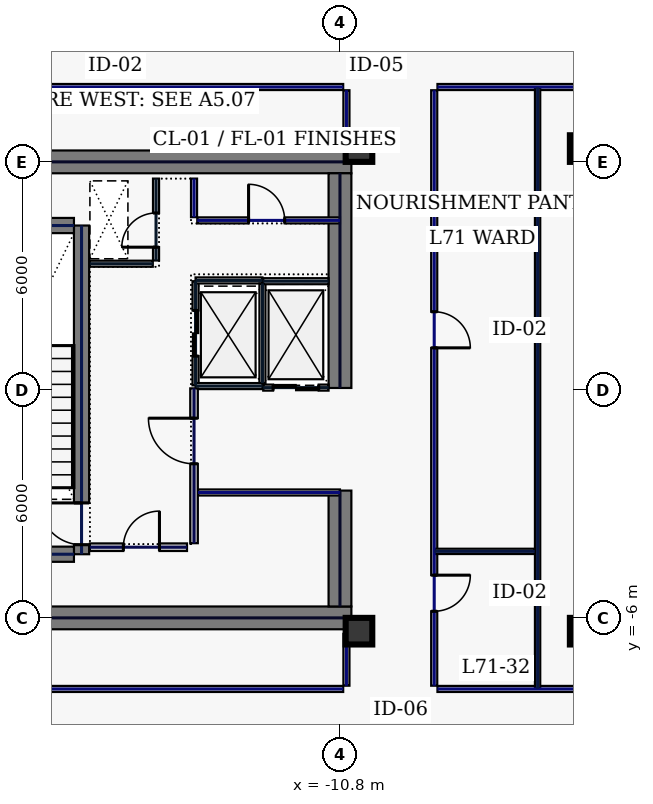
"""IFC4 building model, lengths in metres.
Left out: names, types, materials, properties, quantities, classifications, styles, units other than length and angle.
Written with IfcOpenShell. Run it as: python <this file> out.ifc"""

import sys

from ifc_helpers import new_model, si_unit, direction, frame, frame_2d, origin, origin_2d, place, context, subcontext, project, spatial, rectangle, hollow_rectangle, extrude, element, fill, save


model = new_model("IFC4")
c1 = context("Model", 3, precision=1e-05, world=origin(), true_north=direction((0.0, 1.0)))
c2 = subcontext(c1, "Body", "Model", "MODEL_VIEW")
j1 = project(units=[si_unit("LENGTHUNIT", "METRE"), si_unit("PLANEANGLEUNIT", "RADIAN")], contexts=[c1])
p1 = place(None, origin())
s1 = spatial("IfcSite", under=j1, at=p1, CompositionType="ELEMENT")
p2 = place(p1, origin())
s2 = spatial("IfcBuilding", under=s1, at=p2, CompositionType="ELEMENT")
p3 = place(p2, frame((0.0, 0.0, 305.0)))
s3 = spatial("IfcBuildingStorey", under=s2, at=p3, CompositionType="ELEMENT", Elevation=305.0)
for number, where, z_axis, x_axis in (
    (1, (-22.0, 6.0, 0.0), (0.0, 0.0, 1.0), (1.0, 0.0, 0.0)),
    (2, (-22.0, -6.0, 0.0), (0.0, 0.0, 1.0), (1.0, 0.0, 0.0)),
):
    element("IfcWall", number, at=place(p3, frame(where, z_axis=z_axis, x_axis=x_axis)), inside=s3, PredefinedType="SHEAR", context=c2, shape_type="SweptSolid", body=[
        extrude(rectangle(XDim=11.5, YDim=0.6, at=frame_2d((5.75, 0.0))), origin(), (0.0, 0.0, 1.0), 3.74),
    ])
p4 = place(p3, frame((-10.8, -5.7, 0.0), z_axis=(0.0, 0.0, 1.0), x_axis=(0.0, 1.0, 0.0)))
e3 = element("IfcWall", 3, at=p4, inside=s3, PredefinedType="SHEAR", context=c2, shape_type="SweptSolid", body=[
    extrude(rectangle(XDim=3.05, YDim=0.6, at=frame_2d((1.525, 0.0))), origin(), (0.0, 0.0, 1.0), 3.74),
])
p5 = place(p3, frame((-10.8, 0.05, 0.0), z_axis=(0.0, 0.0, 1.0), x_axis=(0.0, 1.0, 0.0)))
e4 = element("IfcWall", 4, at=p5, inside=s3, PredefinedType="SHEAR", context=c2, shape_type="SweptSolid", body=[
    extrude(rectangle(XDim=5.65, YDim=0.6, at=frame_2d((2.825, 0.0))), origin(), (0.0, 0.0, 1.0), 3.74),
])
p6 = place(p3, frame((-17.6, -4.325, 0.0), z_axis=(0.0, 0.0, 1.0), x_axis=(0.0, 1.0, 0.0)))
e5 = element("IfcWall", 5, at=p6, inside=s3, PredefinedType="SHEAR", context=c2, shape_type="SweptSolid", body=[
    extrude(rectangle(XDim=8.65, YDim=0.4, at=frame_2d((4.325, 0.0))), origin(), (0.0, 0.0, 1.0), 3.74),
])
p7 = place(p6, frame((0.25, 0.0, 0.0)))
e6 = element("IfcOpeningElement", 6, at=p7, cuts=e5, PredefinedType="OPENING", context=c2, shape_type="SweptSolid", body=[
    extrude(rectangle(XDim=1.1, YDim=2.2, at=frame_2d((0.55, 1.1))), frame((0.0, 0.21, 0.0), z_axis=(0.0, -1.0, 0.0), x_axis=(1.0, 0.0, 0.0)), (0.0, 0.0, 1.0), 0.42),
])
for number, where, z_axis, x_axis in (
    (7, (-21.2, -4.325, 0.0), (0.0, 0.0, 1.0), (1.0, 0.0, 0.0)),
    (8, (-21.2, 4.325, 0.0), (0.0, 0.0, 1.0), (1.0, 0.0, 0.0)),
):
    element("IfcWall", number, at=place(p3, frame(where, z_axis=z_axis, x_axis=x_axis)), inside=s3, PredefinedType="SHEAR", context=c2, shape_type="SweptSolid", body=[
        extrude(rectangle(XDim=3.4, YDim=0.4, at=frame_2d((1.7, 0.0))), origin(), (0.0, 0.0, 1.0), 3.74),
    ])
for number, where, z_axis, x_axis in (
    (9, (-10.3, -6.35, 0.0), (0.0, 0.0, 1.0), (1.0, 0.0, 0.0)),
    (10, (-10.3, 6.35, 0.0), (0.0, 0.0, 1.0), (1.0, 0.0, 0.0)),
    (11, (-4.4, -6.35, 0.0), (0.0, 0.0, 1.0), (1.0, 0.0, 0.0)),
    (12, (-4.4, 6.35, 0.0), (0.0, 0.0, 1.0), (1.0, 0.0, 0.0)),
):
    element("IfcColumn", number, at=place(p3, frame(where, z_axis=z_axis, x_axis=x_axis)), inside=s3, PredefinedType="COLUMN", context=c2, shape_type="SweptSolid", body=[
        extrude(hollow_rectangle(XDim=0.7, YDim=0.7, WallThickness=0.032, at=origin_2d()), origin(), (0.0, 0.0, 1.0), 3.74),
    ])
p8 = place(p3, frame((-14.6, 0.12, 0.0), z_axis=(0.0, 0.0, 1.0), x_axis=(0.0, 1.0, 0.0)))
e13 = element("IfcWall", 13, at=p8, inside=s3, PredefinedType="PARTITIONING", context=c2, shape_type="SweptSolid", body=[
    extrude(rectangle(XDim=2.74, YDim=0.16, at=frame_2d((1.37, 0.0))), origin(), (0.0, 0.0, 1.0), 3.74),
])
p9 = place(p8, frame((0.77, 0.0, 0.0)))
e14 = element("IfcOpeningElement", 14, at=p9, cuts=e13, PredefinedType="OPENING", context=c2, shape_type="SweptSolid", body=[
    extrude(rectangle(XDim=1.2, YDim=2.2, at=frame_2d((0.6, 1.1))), frame((0.0, 0.09, 0.0), z_axis=(0.0, -1.0, 0.0), x_axis=(1.0, 0.0, 0.0)), (0.0, 0.0, 1.0), 0.18),
])
for number, where, z_axis, x_axis in (
    (15, (-14.6, 0.1, 0.0), (0.0, 0.0, 1.0), (1.0, 0.0, 0.0)),
    (16, (-14.6, 2.88, 0.0), (0.0, 0.0, 1.0), (1.0, 0.0, 0.0)),
):
    element("IfcWall", number, at=place(p3, frame(where, z_axis=z_axis, x_axis=x_axis)), inside=s3, PredefinedType="PARTITIONING", context=c2, shape_type="SweptSolid", body=[
        extrude(rectangle(XDim=1.76, YDim=0.16, at=frame_2d((0.88, 0.0))), origin(), (0.0, 0.0, 1.0), 3.74),
    ])
p10 = place(p3, frame((-12.84, 0.18, 0.0), z_axis=(0.0, 0.0, 1.0), x_axis=(0.0, 1.0, 0.0)))
e17 = element("IfcWall", 17, at=p10, inside=s3, PredefinedType="PARTITIONING", context=c2, shape_type="SweptSolid", body=[
    extrude(rectangle(XDim=2.62, YDim=0.16, at=frame_2d((1.31, 0.0))), origin(), (0.0, 0.0, 1.0), 3.74),
])
p11 = place(p3, frame((-12.82, 0.06, 0.0), z_axis=(0.0, 0.0, 1.0), x_axis=(1.0, 0.0, 0.0)))
e18 = element("IfcWall", 18, at=p11, inside=s3, PredefinedType="PARTITIONING", context=c2, shape_type="SweptSolid", body=[
    extrude(rectangle(XDim=1.72, YDim=0.16, at=frame_2d((0.86, 0.0))), origin(), (0.0, 0.0, 1.0), 3.74),
])
p12 = place(p11, frame((0.26, 0.0, 0.0)))
e19 = element("IfcOpeningElement", 19, at=p12, cuts=e18, PredefinedType="OPENING", context=c2, shape_type="SweptSolid", body=[
    extrude(rectangle(XDim=1.2, YDim=2.2, at=frame_2d((0.6, 1.1))), frame((0.0, 0.09, 0.0), z_axis=(0.0, -1.0, 0.0), x_axis=(1.0, 0.0, 0.0)), (0.0, 0.0, 1.0), 0.18),
])
p13 = place(p3, frame((-12.82, 2.86, 0.0), z_axis=(0.0, 0.0, 1.0), x_axis=(1.0, 0.0, 0.0)))
e20 = element("IfcWall", 20, at=p13, inside=s3, PredefinedType="PARTITIONING", context=c2, shape_type="SweptSolid", body=[
    extrude(rectangle(XDim=1.72, YDim=0.16, at=frame_2d((0.86, 0.0))), origin(), (0.0, 0.0, 1.0), 3.74),
])
p14 = place(p3, frame((-15.64, 3.405, 0.0), z_axis=(0.0, 0.0, 1.0), x_axis=(0.0, 1.0, 0.0)))
e21 = element("IfcWall", 21, at=p14, inside=s3, PredefinedType="PARTITIONING", context=c2, shape_type="SweptSolid", body=[
    extrude(rectangle(XDim=2.155, YDim=0.16, at=frame_2d((1.078, 0.0))), origin(), (0.0, 0.0, 1.0), 3.74),
])
p15 = place(p14, frame((0.35, 0.0, 0.0)))
e22 = element("IfcOpeningElement", 22, at=p15, cuts=e21, PredefinedType="OPENING", context=c2, shape_type="SweptSolid", body=[
    extrude(rectangle(XDim=0.9, YDim=2.2, at=frame_2d((0.45, 1.1))), frame((0.0, 0.09, 0.0), z_axis=(0.0, -1.0, 0.0), x_axis=(1.0, 0.0, 0.0)), (0.0, 0.0, 1.0), 0.18),
])
p16 = place(p3, frame((-17.38, 3.32, 0.0), z_axis=(0.0, 0.0, 1.0), x_axis=(1.0, 0.0, 0.0)))
e23 = element("IfcWall", 23, at=p16, inside=s3, PredefinedType="PARTITIONING", context=c2, shape_type="SweptSolid", body=[
    extrude(rectangle(XDim=1.655, YDim=0.16, at=frame_2d((0.827, 0.0))), origin(), (0.0, 0.0, 1.0), 3.74),
])
p17 = place(p3, frame((-17.38, -4.14, 0.0), z_axis=(0.0, 0.0, 1.0), x_axis=(1.0, 0.0, 0.0)))
e24 = element("IfcWall", 24, at=p17, inside=s3, PredefinedType="SOLIDWALL", context=c2, shape_type="SweptSolid", body=[
    extrude(rectangle(XDim=2.555, YDim=0.2, at=frame_2d((1.277, 0.0))), origin(), (0.0, 0.0, 1.0), 3.74),
])
p18 = place(p17, frame((0.88, 0.0, 0.0)))
e25 = element("IfcOpeningElement", 25, at=p18, cuts=e24, PredefinedType="OPENING", context=c2, shape_type="SweptSolid", body=[
    extrude(rectangle(XDim=0.95, YDim=2.2, at=frame_2d((0.475, 1.1))), frame((0.0, 0.11, 0.0), z_axis=(0.0, -1.0, 0.0), x_axis=(1.0, 0.0, 0.0)), (0.0, 0.0, 1.0), 0.22),
])
p19 = place(p3, frame((-14.535, -2.7, 0.0), z_axis=(0.0, 0.0, 1.0), x_axis=(1.0, 0.0, 0.0)))
e26 = element("IfcWall", 26, at=p19, inside=s3, PredefinedType="PARTITIONING", context=c2, shape_type="SweptSolid", body=[
    extrude(rectangle(XDim=3.735, YDim=0.16, at=frame_2d((1.867, 0.0))), origin(), (0.0, 0.0, 1.0), 3.74),
])
p20 = place(p3, frame((-14.555, 4.46, 0.0), z_axis=(0.0, 0.0, 1.0), x_axis=(1.0, 0.0, 0.0)))
e27 = element("IfcWall", 27, at=p20, inside=s3, PredefinedType="PARTITIONING", context=c2, shape_type="SweptSolid", body=[
    extrude(rectangle(XDim=3.755, YDim=0.16, at=frame_2d((1.877, 0.0))), origin(), (0.0, 0.0, 1.0), 3.74),
])
p21 = place(p20, frame((1.35, 0.0, 0.0)))
e28 = element("IfcOpeningElement", 28, at=p21, cuts=e27, PredefinedType="OPENING", context=c2, shape_type="SweptSolid", body=[
    extrude(rectangle(XDim=0.95, YDim=2.2, at=frame_2d((0.475, 1.1))), frame((0.0, 0.09, 0.0), z_axis=(0.0, -1.0, 0.0), x_axis=(1.0, 0.0, 0.0)), (0.0, 0.0, 1.0), 0.18),
])
p22 = place(p3, frame((-14.64, 4.545, 0.0), z_axis=(0.0, 0.0, 1.0), x_axis=(0.0, 1.0, 0.0)))
e29 = element("IfcWall", 29, at=p22, inside=s3, PredefinedType="PARTITIONING", context=c2, shape_type="SweptSolid", body=[
    extrude(rectangle(XDim=1.015, YDim=0.16, at=frame_2d((0.508, 0.0))), origin(), (0.0, 0.0, 1.0), 3.74),
])
p23 = place(p3, frame((-14.64, -4.035, 0.0), z_axis=(0.0, 0.0, 1.0), x_axis=(0.0, 1.0, 0.0)))
e30 = element("IfcWall", 30, at=p23, inside=s3, PredefinedType="SOLIDWALL", context=c2, shape_type="SweptSolid", body=[
    extrude(rectangle(XDim=4.075, YDim=0.2, at=frame_2d((2.038, 0.0))), origin(), (0.0, 0.0, 1.0), 3.74),
])
p24 = place(p23, frame((2.09, 0.0, 0.0)))
e31 = element("IfcOpeningElement", 31, at=p24, cuts=e30, PredefinedType="OPENING", context=c2, shape_type="SweptSolid", body=[
    extrude(rectangle(XDim=1.2, YDim=2.2, at=frame_2d((0.6, 1.1))), frame((0.0, 0.11, 0.0), z_axis=(0.0, -1.0, 0.0), x_axis=(1.0, 0.0, 0.0)), (0.0, 0.0, 1.0), 0.22),
])
p25 = place(p3, frame((-3.965, 7.97, 0.0), z_axis=(0.0, 0.0, 1.0), x_axis=(-1.0, 0.0, 0.0)))
e32 = element("IfcWall", 32, at=p25, inside=s3, PredefinedType="PARTITIONING", context=c2, shape_type="SweptSolid", body=[
    extrude(rectangle(XDim=4.27, YDim=0.16, at=frame_2d((2.135, 0.0))), origin(), (0.0, 0.0, 1.0), 3.74),
])
p26 = place(p3, frame((-8.32, 7.885, 0.0), z_axis=(0.0, 0.0, 1.0), x_axis=(0.0, -1.0, 0.0)))
e33 = element("IfcWall", 33, at=p26, inside=s3, PredefinedType="PARTITIONING", context=c2, shape_type="SweptSolid", body=[
    extrude(rectangle(XDim=15.67, YDim=0.16, at=frame_2d((7.835, 0.0))), origin(), (0.0, 0.0, 1.0), 3.74),
])
p27 = place(p26, frame((12.761, 0.0, 0.0)))
e34 = element("IfcOpeningElement", 34, at=p27, cuts=e33, PredefinedType="OPENING", context=c2, shape_type="SweptSolid", body=[
    extrude(rectangle(XDim=0.95, YDim=2.2, at=frame_2d((0.475, 1.1))), frame((0.0, 0.09, 0.0), z_axis=(0.0, -1.0, 0.0), x_axis=(1.0, 0.0, 0.0)), (0.0, 0.0, 1.0), 0.18),
])
p28 = place(p26, frame((5.829, 0.0, 0.0)))
e35 = element("IfcOpeningElement", 35, at=p28, cuts=e33, PredefinedType="OPENING", context=c2, shape_type="SweptSolid", body=[
    extrude(rectangle(XDim=0.95, YDim=2.2, at=frame_2d((0.475, 1.1))), frame((0.0, 0.09, 0.0), z_axis=(0.0, -1.0, 0.0), x_axis=(1.0, 0.0, 0.0)), (0.0, 0.0, 1.0), 0.18),
])
p29 = place(p3, frame((-8.235, -7.87, 0.0), z_axis=(0.0, 0.0, 1.0), x_axis=(1.0, 0.0, 0.0)))
e36 = element("IfcWall", 36, at=p29, inside=s3, PredefinedType="PARTITIONING", context=c2, shape_type="SweptSolid", body=[
    extrude(rectangle(XDim=4.27, YDim=0.16, at=frame_2d((2.135, 0.0))), origin(), (0.0, 0.0, 1.0), 3.74),
])
p30 = place(p3, frame((-10.63, -7.785, 0.0), z_axis=(0.0, 0.0, 1.0), x_axis=(0.0, 1.0, 0.0)))
e37 = element("IfcWall", 37, at=p30, inside=s3, PredefinedType="PARTITIONING", context=c2, shape_type="SweptSolid", body=[
    extrude(rectangle(XDim=1.365, YDim=0.16, at=frame_2d((0.683, 0.0))), origin(), (0.0, 0.0, 1.0), 3.74),
])
p31 = place(p3, frame((-10.63, 6.42, 0.0), z_axis=(0.0, 0.0, 1.0), x_axis=(0.0, 1.0, 0.0)))
e38 = element("IfcWall", 38, at=p31, inside=s3, PredefinedType="PARTITIONING", context=c2, shape_type="SweptSolid", body=[
    extrude(rectangle(XDim=1.465, YDim=0.16, at=frame_2d((0.732, 0.0))), origin(), (0.0, 0.0, 1.0), 3.74),
])
for number, where, z_axis, x_axis in (
    (39, (-10.715, 7.97, 0.0), (0.0, 0.0, 1.0), (-1.0, 0.0, 0.0)),
    (40, (-21.915, -7.87, 0.0), (0.0, 0.0, 1.0), (1.0, 0.0, 0.0)),
):
    element("IfcWall", number, at=place(p3, frame(where, z_axis=z_axis, x_axis=x_axis)), inside=s3, PredefinedType="PARTITIONING", context=c2, shape_type="SweptSolid", body=[
        extrude(rectangle(XDim=11.2, YDim=0.16, at=frame_2d((5.6, 0.0))), origin(), (0.0, 0.0, 1.0), 3.74),
    ])
p32 = place(p3, frame((-5.6, -7.865, 0.0), z_axis=(0.0, 0.0, 1.0), x_axis=(0.0, 1.0, 0.0)))
e41 = element("IfcWall", 41, at=p32, inside=s3, PredefinedType="PARTITIONING", context=c2, shape_type="SweptSolid", body=[
    extrude(rectangle(XDim=15.83, YDim=0.14, at=frame_2d((7.915, 0.0))), origin(), (0.0, 0.0, 1.0), 3.74),
])
p33 = place(p3, frame((-8.315, -4.25, 0.0), z_axis=(0.0, 0.0, 1.0), x_axis=(1.0, 0.0, 0.0)))
e42 = element("IfcWall", 42, at=p33, inside=s3, PredefinedType="PARTITIONING", context=c2, shape_type="SweptSolid", body=[
    extrude(rectangle(XDim=2.64, YDim=0.14, at=frame_2d((1.32, 0.0))), origin(), (0.0, 0.0, 1.0), 3.74),
])
p34 = place(p7, origin())
e43 = element("IfcDoor", 43, at=p34, inside=s3, OperationType="SINGLE_SWING_RIGHT", PredefinedType="DOOR", context=c2, shape_type="SweptSolid", body=[
    extrude(rectangle(XDim=1.1, YDim=2.2, at=frame_2d((0.55, 1.1))), frame((0.0, 0.025, 0.0), z_axis=(0.0, -1.0, 0.0), x_axis=(1.0, 0.0, 0.0)), (0.0, 0.0, 1.0), 0.05),
])
fill(e6, e43)
p35 = place(p9, origin())
e44 = element("IfcDoor", 44, at=p35, inside=s3, OperationType="SLIDING_TO_LEFT", PredefinedType="DOOR", context=c2, shape_type="SweptSolid", body=[
    extrude(rectangle(XDim=1.2, YDim=2.2, at=frame_2d((0.6, 1.1))), frame((0.0, 0.025, 0.0), z_axis=(0.0, -1.0, 0.0), x_axis=(1.0, 0.0, 0.0)), (0.0, 0.0, 1.0), 0.05),
])
fill(e14, e44)
p36 = place(p12, origin())
e45 = element("IfcDoor", 45, at=p36, inside=s3, OperationType="SLIDING_TO_LEFT", PredefinedType="DOOR", context=c2, shape_type="SweptSolid", body=[
    extrude(rectangle(XDim=1.2, YDim=2.2, at=frame_2d((0.6, 1.1))), frame((0.0, 0.025, 0.0), z_axis=(0.0, -1.0, 0.0), x_axis=(1.0, 0.0, 0.0)), (0.0, 0.0, 1.0), 0.05),
])
fill(e19, e45)
p37 = place(p15, origin())
e46 = element("IfcDoor", 46, at=p37, inside=s3, OperationType="SINGLE_SWING_LEFT", PredefinedType="DOOR", context=c2, shape_type="SweptSolid", body=[
    extrude(rectangle(XDim=0.9, YDim=2.2, at=frame_2d((0.45, 1.1))), frame((0.0, 0.025, 0.0), z_axis=(0.0, -1.0, 0.0), x_axis=(1.0, 0.0, 0.0)), (0.0, 0.0, 1.0), 0.05),
])
fill(e22, e46)
p38 = place(p18, origin())
e47 = element("IfcDoor", 47, at=p38, inside=s3, OperationType="SINGLE_SWING_RIGHT", PredefinedType="DOOR", context=c2, shape_type="SweptSolid", body=[
    extrude(rectangle(XDim=0.95, YDim=2.2, at=frame_2d((0.475, 1.1))), frame((0.0, 0.025, 0.0), z_axis=(0.0, -1.0, 0.0), x_axis=(1.0, 0.0, 0.0)), (0.0, 0.0, 1.0), 0.05),
])
fill(e25, e47)
p39 = place(p21, origin())
e48 = element("IfcDoor", 48, at=p39, inside=s3, OperationType="SINGLE_SWING_LEFT", PredefinedType="DOOR", context=c2, shape_type="SweptSolid", body=[
    extrude(rectangle(XDim=0.95, YDim=2.2, at=frame_2d((0.475, 1.1))), frame((0.0, 0.025, 0.0), z_axis=(0.0, -1.0, 0.0), x_axis=(1.0, 0.0, 0.0)), (0.0, 0.0, 1.0), 0.05),
])
fill(e28, e48)
p40 = place(p24, origin())
e49 = element("IfcDoor", 49, at=p40, inside=s3, OperationType="SINGLE_SWING_RIGHT", PredefinedType="DOOR", context=c2, shape_type="SweptSolid", body=[
    extrude(rectangle(XDim=1.2, YDim=2.2, at=frame_2d((0.6, 1.1))), frame((0.0, 0.025, 0.0), z_axis=(0.0, -1.0, 0.0), x_axis=(1.0, 0.0, 0.0)), (0.0, 0.0, 1.0), 0.05),
])
fill(e31, e49)
p41 = place(p27, origin())
e50 = element("IfcDoor", 50, at=p41, inside=s3, OperationType="SINGLE_SWING_LEFT", PredefinedType="DOOR", context=c2, shape_type="SweptSolid", body=[
    extrude(rectangle(XDim=0.95, YDim=2.2, at=frame_2d((0.475, 1.1))), frame((0.0, 0.025, 0.0), z_axis=(0.0, -1.0, 0.0), x_axis=(1.0, 0.0, 0.0)), (0.0, 0.0, 1.0), 0.05),
])
fill(e34, e50)
p42 = place(p28, origin())
e51 = element("IfcDoor", 51, at=p42, inside=s3, OperationType="SINGLE_SWING_RIGHT", PredefinedType="DOOR", context=c2, shape_type="SweptSolid", body=[
    extrude(rectangle(XDim=0.95, YDim=2.2, at=frame_2d((0.475, 1.1))), frame((0.0, 0.025, 0.0), z_axis=(0.0, -1.0, 0.0), x_axis=(1.0, 0.0, 0.0)), (0.0, 0.0, 1.0), 0.05),
])
fill(e35, e51)
save(model, sys.argv[1])
